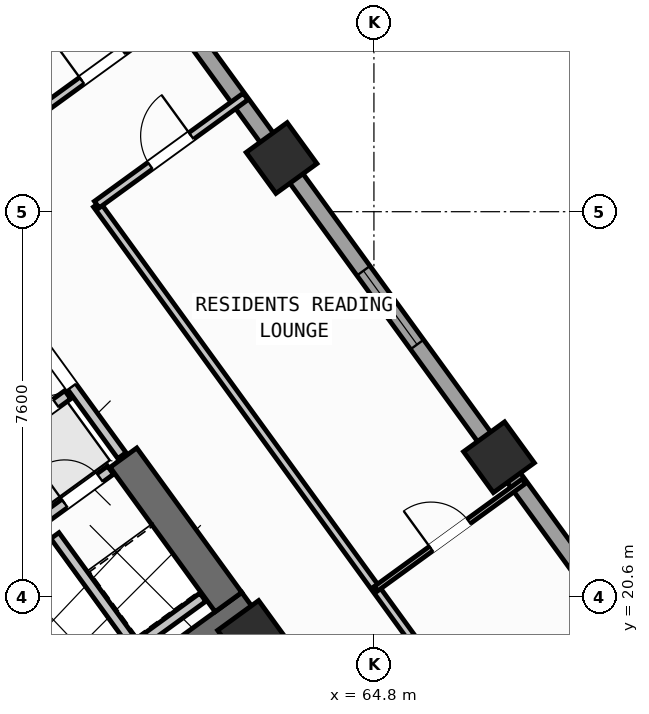
"""IFC4 building model, lengths in metres.
Left out: names, types, materials, properties, quantities, classifications, styles, units other than length and angle.
Written with IfcOpenShell. Run it as: python <this file> out.ifc"""

import sys

from ifc_helpers import new_model, si_unit, direction, frame, frame_2d, origin, origin_2d, place, context, subcontext, project, spatial, rectangle, hollow_rectangle, extrude, source, transform, mapped, element, fill, save


model = new_model("IFC4")
c1 = context("Model", 3, precision=1e-05, world=origin(), true_north=direction((0.0, 1.0)))
c2 = subcontext(c1, "Body", "Model", "MODEL_VIEW")
j1 = project(units=[si_unit("LENGTHUNIT", "METRE"), si_unit("PLANEANGLEUNIT", "RADIAN")], contexts=[c1])
p1 = place(None, origin())
s1 = spatial("IfcSite", under=j1, at=p1, CompositionType="ELEMENT")
p2 = place(p1, origin())
s2 = spatial("IfcBuilding", under=s1, at=p2, CompositionType="ELEMENT")
p3 = place(p2, frame((0.0, 0.0, 42.0)))
s3 = spatial("IfcBuildingStorey", under=s2, at=p3, CompositionType="ELEMENT", Elevation=42.0)
p4 = place(p3, frame((52.318, 13.11, 0.0), z_axis=(0.0, 0.0, 1.0), x_axis=(0.809019445368, 0.587781878776, 0.0)))
e1 = element("IfcWall", 1, at=p4, inside=s3, PredefinedType="SHEAR", context=c2, shape_type="SweptSolid", body=[
    extrude(rectangle(XDim=12.44, YDim=0.65, at=frame_2d((6.22, 0.0))), origin(), (0.0, 0.0, 1.0), 3.35),
])
p5 = place(p3, frame((61.929, 20.494, 0.0), z_axis=(0.0, 0.0, 1.0), x_axis=(-0.58782982593, 0.808984607855, 0.0)))
e2 = element("IfcWall", 2, at=p5, inside=s3, PredefinedType="SHEAR", context=c2, shape_type="SweptSolid", body=[
    extrude(rectangle(XDim=3.525, YDim=0.65, at=frame_2d((1.762, 0.0))), origin(), (0.0, 0.0, 1.0), 3.35),
])
m1 = source(origin(), c2, "Body", "SweptSolid", [
    extrude(hollow_rectangle(XDim=1.0, YDim=1.0, WallThickness=0.04, at=origin_2d()), origin(), (0.0, 0.0, 1.0), 3.6),
])
for number, where, z_axis, x_axis in (
    (3, (62.414, 19.827, 0.0), (0.0, 0.0, 1.0), (0.809, 0.588, 0.0)),
    (4, (67.268, 23.354, 0.0), (0.0, 0.0, 1.0), (0.809, 0.588, 0.0)),
    (5, (62.977, 29.259, 0.0), (0.0, 0.0, 1.0), (0.809, 0.588, 0.0)),
):
    element("IfcColumn", number, at=place(p3, frame(where, z_axis=z_axis, x_axis=x_axis)), inside=s3, PredefinedType="COLUMN", context=c2, shape_type="MappedRepresentation", body=[
        mapped(m1, transform((0.0, 0.0, 0.0), scale=1.0)),
    ])
p6 = place(p3, frame((58.455, 35.484, 0.0), z_axis=(0.0, 0.0, 1.0), x_axis=(0.587783625747, -0.809018176127, 0.0)))
e6 = element("IfcWall", 6, at=p6, inside=s3, PredefinedType="STANDARD", context=c2, shape_type="SweptSolid", body=[
    extrude(rectangle(XDim=21.587, YDim=0.32, at=frame_2d((10.794, 0.0))), origin(), (0.0, 0.0, 1.0), 2.725),
])
p7 = place(p6, frame((1.529, 0.0, 0.85)))
e7 = element("IfcOpeningElement", 7, at=p7, cuts=e6, PredefinedType="OPENING", context=c2, shape_type="SweptSolid", body=[
    extrude(rectangle(XDim=1.8, YDim=1.5, at=frame_2d((0.9, 0.75))), frame((0.0, 0.17, 0.0), z_axis=(0.0, -1.0, 0.0), x_axis=(1.0, 0.0, 0.0)), (0.0, 0.0, 1.0), 0.34),
])
p8 = place(p6, frame((10.444, 0.0, 0.85)))
e8 = element("IfcOpeningElement", 8, at=p8, cuts=e6, PredefinedType="OPENING", context=c2, shape_type="SweptSolid", body=[
    extrude(rectangle(XDim=1.8, YDim=1.5, at=frame_2d((0.9, 0.75))), frame((0.0, 0.17, 0.0), z_axis=(0.0, -1.0, 0.0), x_axis=(1.0, 0.0, 0.0)), (0.0, 0.0, 1.0), 0.34),
])
p9 = place(p6, frame((17.595, 0.0, 0.85)))
e9 = element("IfcOpeningElement", 9, at=p9, cuts=e6, PredefinedType="OPENING", context=c2, shape_type="SweptSolid", body=[
    extrude(rectangle(XDim=1.5, YDim=1.5, at=frame_2d((0.75, 0.75))), frame((0.0, 0.17, 0.0), z_axis=(0.0, -1.0, 0.0), x_axis=(1.0, 0.0, 0.0)), (0.0, 0.0, 1.0), 0.34),
])
p10 = place(p3, frame((58.41, 18.327, 0.0), z_axis=(0.0, 0.0, 1.0), x_axis=(-0.58776738483, 0.809029975545, 0.0)))
e10 = element("IfcWall", 10, at=p10, inside=s3, PredefinedType="SHEAR", context=c2, shape_type="SweptSolid", body=[
    extrude(rectangle(XDim=3.16, YDim=0.26, at=frame_2d((1.58, 0.0))), origin(), (0.0, 0.0, 1.0), 3.35),
])
p11 = place(p3, frame((56.553, 20.884, 0.0), z_axis=(0.0, 0.0, 1.0), x_axis=(0.809035789462, 0.587759382205, 0.0)))
e11 = element("IfcWall", 11, at=p11, inside=s3, PredefinedType="STANDARD", context=c2, shape_type="SweptSolid", body=[
    extrude(rectangle(XDim=3.768, YDim=0.2, at=frame_2d((1.884, 0.0))), origin(), (0.0, 0.0, 1.0), 3.34),
])
p12 = place(p11, frame((2.65, 0.0, 0.0)))
e12 = element("IfcOpeningElement", 12, at=p12, cuts=e11, PredefinedType="OPENING", context=c2, shape_type="SweptSolid", body=[
    extrude(rectangle(XDim=0.86, YDim=2.05, at=frame_2d((0.43, 1.025))), frame((0.0, 0.11, 0.0), z_axis=(0.0, -1.0, 0.0), x_axis=(1.0, 0.0, 0.0)), (0.0, 0.0, 1.0), 0.22),
])
p13 = place(p3, frame((54.421, 21.436, 0.0), z_axis=(0.0, 0.0, 1.0), x_axis=(0.809013710463, 0.587789772183, 0.0)))
e13 = element("IfcWall", 13, at=p13, inside=s3, PredefinedType="STANDARD", context=c2, shape_type="SweptSolid", body=[
    extrude(rectangle(XDim=5.36, YDim=0.2, at=frame_2d((2.68, 0.0))), origin(), (0.0, 0.0, 1.0), 3.34),
])
p14 = place(p13, frame((0.37, 0.0, 0.0)))
e14 = element("IfcOpeningElement", 14, at=p14, cuts=e13, PredefinedType="OPENING", context=c2, shape_type="SweptSolid", body=[
    extrude(rectangle(XDim=1.1, YDim=2.15, at=frame_2d((0.55, 1.075))), frame((0.0, 0.11, 0.0), z_axis=(0.0, -1.0, 0.0), x_axis=(1.0, 0.0, 0.0)), (0.0, 0.0, 1.0), 0.22),
])
p15 = place(p13, frame((2.17, 0.0, 0.0)))
e15 = element("IfcOpeningElement", 15, at=p15, cuts=e13, PredefinedType="OPENING", context=c2, shape_type="SweptSolid", body=[
    extrude(rectangle(XDim=1.1, YDim=2.15, at=frame_2d((0.55, 1.075))), frame((0.0, 0.11, 0.0), z_axis=(0.0, -1.0, 0.0), x_axis=(1.0, 0.0, 0.0)), (0.0, 0.0, 1.0), 0.22),
])
p16 = place(p13, frame((3.97, 0.0, 0.0)))
e16 = element("IfcOpeningElement", 16, at=p16, cuts=e13, PredefinedType="OPENING", context=c2, shape_type="SweptSolid", body=[
    extrude(rectangle(XDim=1.1, YDim=2.15, at=frame_2d((0.55, 1.075))), frame((0.0, 0.11, 0.0), z_axis=(0.0, -1.0, 0.0), x_axis=(1.0, 0.0, 0.0)), (0.0, 0.0, 1.0), 0.22),
])
p17 = place(p3, frame((60.067, 19.655, 0.0), z_axis=(0.0, 0.0, 1.0), x_axis=(-0.587800520745, 0.809005900975, 0.0)))
e17 = element("IfcWall", 17, at=p17, inside=s3, PredefinedType="STANDARD", context=c2, shape_type="SweptSolid", body=[
    extrude(rectangle(XDim=2.66, YDim=0.2, at=frame_2d((1.33, 0.0))), origin(), (0.0, 0.0, 1.0), 3.34),
])
p18 = place(p3, frame((58.472, 18.447, 0.0), z_axis=(0.0, 0.0, 1.0), x_axis=(0.809022487728, 0.587777691266, 0.0)))
e18 = element("IfcWall", 18, at=p18, inside=s3, PredefinedType="STANDARD", context=c2, shape_type="SweptSolid", body=[
    extrude(rectangle(XDim=3.648, YDim=0.2, at=frame_2d((1.824, 0.0))), origin(), (0.0, 0.0, 1.0), 3.34),
])
p19 = place(p3, frame((59.827, 23.386, 0.0), z_axis=(0.0, 0.0, 1.0), x_axis=(-0.587803840107, 0.809003489211, 0.0)))
e19 = element("IfcWall", 19, at=p19, inside=s3, PredefinedType="STANDARD", context=c2, shape_type="SweptSolid", body=[
    extrude(rectangle(XDim=2.96, YDim=0.2, at=frame_2d((1.48, 0.0))), origin(), (0.0, 0.0, 1.0), 3.34),
])
p20 = place(p19, frame((1.68, 0.0, 0.0)))
e20 = element("IfcOpeningElement", 20, at=p20, cuts=e19, PredefinedType="OPENING", context=c2, shape_type="SweptSolid", body=[
    extrude(rectangle(XDim=1.0, YDim=2.1, at=frame_2d((0.5, 1.05))), frame((0.0, 0.11, 0.0), z_axis=(0.0, -1.0, 0.0), x_axis=(1.0, 0.0, 0.0)), (0.0, 0.0, 1.0), 0.22),
])
p21 = place(p3, frame((63.507, 18.322, 0.0), z_axis=(0.0, 0.0, 1.0), x_axis=(0.809034604122, 0.587761013791, 0.0)))
e21 = element("IfcWall", 21, at=p21, inside=s3, PredefinedType="PARTITIONING", context=c2, shape_type="SweptSolid", body=[
    extrude(rectangle(XDim=2.51, YDim=0.16, at=frame_2d((1.255, 0.0))), origin(), (0.0, 0.0, 1.0), 3.34),
])
p22 = place(p3, frame((68.353, 15.922, 0.0), z_axis=(0.0, 0.0, 1.0), x_axis=(-0.587782002009, 0.809019355834, 0.0)))
e22 = element("IfcWall", 22, at=p22, inside=s3, PredefinedType="PARTITIONING", context=c2, shape_type="SweptSolid", body=[
    extrude(rectangle(XDim=15.35, YDim=0.16, at=frame_2d((7.675, 0.0))), origin(), (0.0, 0.0, 1.0), 3.34),
])
p23 = place(p3, frame((59.331, 28.341, 0.0), z_axis=(0.0, 0.0, 1.0), x_axis=(0.809003564202, 0.587803736896, 0.0)))
e23 = element("IfcWall", 23, at=p23, inside=s3, PredefinedType="PARTITIONING", context=c2, shape_type="SweptSolid", body=[
    extrude(rectangle(XDim=3.63, YDim=0.16, at=frame_2d((1.815, 0.0))), origin(), (0.0, 0.0, 1.0), 3.34),
])
p24 = place(p23, frame((1.305, 0.0, 0.0)))
e24 = element("IfcOpeningElement", 24, at=p24, cuts=e23, PredefinedType="OPENING", context=c2, shape_type="SweptSolid", body=[
    extrude(rectangle(XDim=1.0, YDim=2.1, at=frame_2d((0.5, 1.05))), frame((0.0, 0.09, 0.0), z_axis=(0.0, -1.0, 0.0), x_axis=(1.0, 0.0, 0.0)), (0.0, 0.0, 1.0), 0.18),
])
p25 = place(p3, frame((58.067, 30.08, 0.0), z_axis=(0.0, 0.0, 1.0), x_axis=(0.809012309495, 0.587791700422, 0.0)))
e25 = element("IfcWall", 25, at=p25, inside=s3, PredefinedType="PARTITIONING", context=c2, shape_type="SweptSolid", body=[
    extrude(rectangle(XDim=3.63, YDim=0.16, at=frame_2d((1.815, 0.0))), origin(), (0.0, 0.0, 1.0), 3.34),
])
p26 = place(p25, frame((1.2, 0.0, 0.0)))
e26 = element("IfcOpeningElement", 26, at=p26, cuts=e25, PredefinedType="OPENING", context=c2, shape_type="SweptSolid", body=[
    extrude(rectangle(XDim=1.0, YDim=2.1, at=frame_2d((0.5, 1.05))), frame((0.0, 0.09, 0.0), z_axis=(0.0, -1.0, 0.0), x_axis=(1.0, 0.0, 0.0)), (0.0, 0.0, 1.0), 0.18),
])
p27 = place(p3, frame((64.839, 20.759, 0.0), z_axis=(0.0, 0.0, 1.0), x_axis=(0.809013833588, 0.587789602718, 0.0)))
e27 = element("IfcWall", 27, at=p27, inside=s3, PredefinedType="PARTITIONING", context=c2, shape_type="SweptSolid", body=[
    extrude(rectangle(XDim=3.61, YDim=0.11, at=frame_2d((1.805, 0.0))), origin(), (0.0, 0.0, 1.0), 3.34),
])
p28 = place(p27, frame((1.345, 0.0, 0.0)))
e28 = element("IfcOpeningElement", 28, at=p28, cuts=e27, PredefinedType="OPENING", context=c2, shape_type="SweptSolid", body=[
    extrude(rectangle(XDim=0.92, YDim=2.08, at=frame_2d((0.46, 1.04))), frame((0.0, 0.065, 0.0), z_axis=(0.0, -1.0, 0.0), x_axis=(1.0, 0.0, 0.0)), (0.0, 0.0, 1.0), 0.13),
])
m2 = source(origin(), c2, "Body", "SweptSolid", [
    extrude(rectangle(XDim=1.8, YDim=1.5, at=frame_2d((0.9, 0.75))), frame((0.0, 0.03, 0.0), z_axis=(0.0, -1.0, 0.0), x_axis=(1.0, 0.0, 0.0)), (0.0, 0.0, 1.0), 0.06),
])
p29 = place(p8, origin())
e29 = element("IfcWindow", 29, at=p29, inside=s3, PartitioningType="SINGLE_PANEL", PredefinedType="WINDOW", context=c2, shape_type="MappedRepresentation", body=[
    mapped(m2, transform((0.0, 0.0, 0.0), scale=1.0)),
])
fill(e8, e29)
m3 = source(origin(), c2, "Body", "SweptSolid", [
    extrude(rectangle(XDim=1.1, YDim=2.15, at=frame_2d((0.55, 1.075))), frame((0.0, 0.025, 0.0), z_axis=(0.0, -1.0, 0.0), x_axis=(1.0, 0.0, 0.0)), (0.0, 0.0, 1.0), 0.05),
])
p30 = place(p16, origin())
e30 = element("IfcDoor", 30, at=p30, inside=s3, OperationType="DOUBLE_DOOR_SLIDING", PredefinedType="DOOR", context=c2, shape_type="MappedRepresentation", body=[
    mapped(m3, transform((0.0, 0.0, 0.0), scale=1.0)),
])
fill(e16, e30)
m4 = source(origin(), c2, "Body", "SweptSolid", [
    extrude(rectangle(XDim=0.86, YDim=2.05, at=frame_2d((0.43, 1.025))), frame((0.0, 0.025, 0.0), z_axis=(0.0, -1.0, 0.0), x_axis=(1.0, 0.0, 0.0)), (0.0, 0.0, 1.0), 0.05),
])
p31 = place(p12, origin())
e31 = element("IfcDoor", 31, at=p31, inside=s3, OperationType="SINGLE_SWING_LEFT", PredefinedType="DOOR", context=c2, shape_type="MappedRepresentation", body=[
    mapped(m4, transform((0.0, 0.0, 0.0), scale=1.0)),
])
fill(e12, e31)
m5 = source(origin(), c2, "Body", "SweptSolid", [
    extrude(rectangle(XDim=1.0, YDim=2.1, at=frame_2d((0.5, 1.05))), frame((0.0, 0.025, 0.0), z_axis=(0.0, -1.0, 0.0), x_axis=(1.0, 0.0, 0.0)), (0.0, 0.0, 1.0), 0.05),
])
p32 = place(p20, origin())
e32 = element("IfcDoor", 32, at=p32, inside=s3, OperationType="SINGLE_SWING_RIGHT", PredefinedType="DOOR", context=c2, shape_type="MappedRepresentation", body=[
    mapped(m5, transform((0.0, 0.0, 0.0), scale=1.0)),
])
fill(e20, e32)
p33 = place(p26, origin())
e33 = element("IfcDoor", 33, at=p33, inside=s3, OperationType="SINGLE_SWING_LEFT", PredefinedType="DOOR", context=c2, shape_type="MappedRepresentation", body=[
    mapped(m5, transform((0.0, 0.0, 0.0), scale=1.0)),
])
fill(e26, e33)
p34 = place(p24, origin())
e34 = element("IfcDoor", 34, at=p34, inside=s3, OperationType="SINGLE_SWING_RIGHT", PredefinedType="DOOR", context=c2, shape_type="MappedRepresentation", body=[
    mapped(m5, transform((0.0, 0.0, 0.0), scale=1.0)),
])
fill(e24, e34)
m6 = source(origin(), c2, "Body", "SweptSolid", [
    extrude(rectangle(XDim=0.92, YDim=2.08, at=frame_2d((0.46, 1.04))), frame((0.0, 0.025, 0.0), z_axis=(0.0, -1.0, 0.0), x_axis=(1.0, 0.0, 0.0)), (0.0, 0.0, 1.0), 0.05),
])
p35 = place(p28, origin())
e35 = element("IfcDoor", 35, at=p35, inside=s3, OperationType="SINGLE_SWING_LEFT", PredefinedType="DOOR", context=c2, shape_type="MappedRepresentation", body=[
    mapped(m6, transform((0.0, 0.0, 0.0), scale=1.0)),
])
fill(e28, e35)
save(model, sys.argv[1])
